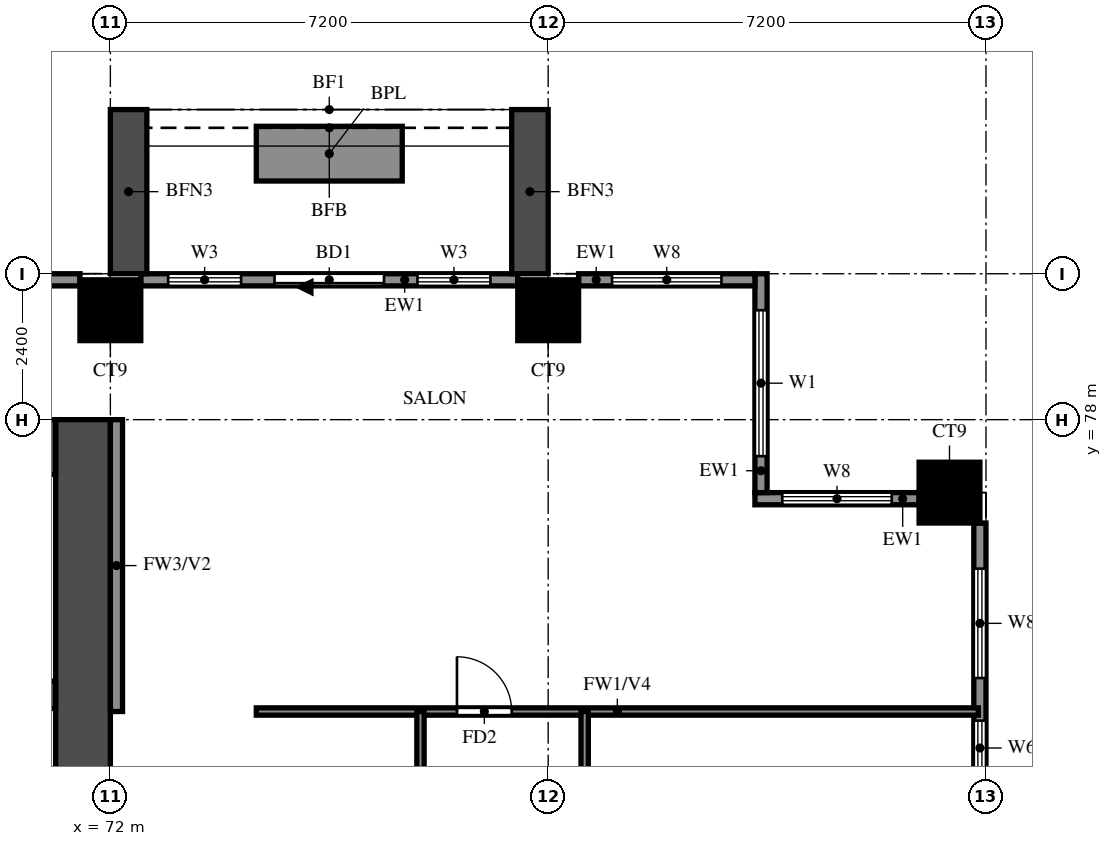
"""IFC4 building model, lengths in metres.
Left out: names, types, materials, properties, quantities, classifications, styles, units other than length and angle.
Written with IfcOpenShell. Run it as: python <this file> out.ifc"""

import sys

from ifc_helpers import new_model, si_unit, direction, frame, frame_2d, origin, origin_2d, place, context, subcontext, project, spatial, rectangle, extrude, source, transform, mapped, element, fill, save


model = new_model("IFC4")
c1 = context("Model", 3, precision=1e-05, world=origin(), true_north=direction((0.0, 1.0)))
c2 = subcontext(c1, "Body", "Model", "MODEL_VIEW")
j1 = project(units=[si_unit("LENGTHUNIT", "METRE"), si_unit("PLANEANGLEUNIT", "RADIAN")], contexts=[c1])
p1 = place(None, origin())
s1 = spatial("IfcSite", under=j1, at=p1, CompositionType="ELEMENT")
p2 = place(p1, origin())
s2 = spatial("IfcBuilding", under=s1, at=p2, CompositionType="ELEMENT")
p3 = place(p2, frame((0.0, 0.0, 65.5)))
s3 = spatial("IfcBuildingStorey", under=s2, at=p3, CompositionType="ELEMENT", Elevation=65.5)
m1 = source(origin(), c2, "Body", "SweptSolid", [
    extrude(rectangle(XDim=1.0, YDim=1.0, at=origin_2d()), origin(), (0.0, 0.0, 1.0), 3.18),
])
for number, where, z_axis, x_axis in (
    (1, (85.8, 76.8, 0.0), (0.0, 0.0, 1.0), (1.0, 0.0, 0.0)),
    (2, (72.0, 79.8, 0.0), (0.0, 0.0, 1.0), (1.0, 0.0, 0.0)),
    (3, (79.2, 79.8, 0.0), (0.0, 0.0, 1.0), (1.0, 0.0, 0.0)),
):
    element("IfcColumn", number, at=place(p3, frame(where, z_axis=z_axis, x_axis=x_axis)), inside=s3, PredefinedType="COLUMN", context=c2, shape_type="MappedRepresentation", body=[
        mapped(m1, transform((0.0, 0.0, 0.0))),
    ])
p4 = place(p3, frame((71.55, 66.0, 0.0), z_axis=(0.0, 0.0, 1.0), x_axis=(0.0, 1.0, 0.0)))
e4 = element("IfcWall", 4, at=p4, inside=s3, PredefinedType="SHEAR", context=c2, shape_type="SweptSolid", body=[
    extrude(rectangle(XDim=12.0, YDim=0.9, at=frame_2d((6.0, 0.0))), origin(), (0.0, 0.0, 1.0), 3.18),
])
p5 = place(p3, frame((29.7, 77.55, 0.0), z_axis=(0.0, 0.0, 1.0), x_axis=(1.0, 0.0, 0.0)))
e5 = element("IfcWall", 5, at=p5, inside=s3, PredefinedType="SHEAR", context=c2, shape_type="SweptSolid", body=[
    extrude(rectangle(XDim=41.4, YDim=0.9, at=frame_2d((20.7, 0.0))), origin(), (0.0, 0.0, 1.0), 3.18),
])
p6 = place(p3, frame((67.925, 73.475, 0.0), z_axis=(0.0, 0.0, 1.0), x_axis=(1.0, 0.0, 0.0)))
e6 = element("IfcWall", 6, at=p6, inside=s3, PredefinedType="SHEAR", context=c2, shape_type="SweptSolid", body=[
    extrude(rectangle(XDim=3.175, YDim=0.45, at=frame_2d((1.587, 0.0))), origin(), (0.0, 0.0, 1.0), 3.18),
])
p7 = place(p3, frame((86.3, 70.1, 0.0), z_axis=(0.0, 0.0, 1.0), x_axis=(0.0, 1.0, 0.0)))
e7 = element("IfcWall", 7, at=p7, inside=s3, PredefinedType="SOLIDWALL", context=c2, shape_type="SweptSolid", body=[
    extrude(rectangle(XDim=6.2, YDim=0.2, at=frame_2d((3.1, 0.0))), origin(), (0.0, 0.0, 1.0), 3.18),
])
p8 = place(p7, frame((2.05, 0.0, 1.5)))
e8 = element("IfcOpeningElement", 8, at=p8, cuts=e7, PredefinedType="OPENING", context=c2, shape_type="SweptSolid", body=[
    extrude(rectangle(XDim=0.9, YDim=0.9, at=frame_2d((0.45, 0.45))), frame((0.0, 0.11, 0.0), z_axis=(0.0, -1.0, 0.0), x_axis=(1.0, 0.0, 0.0)), (0.0, 0.0, 1.0), 0.22),
])
p9 = place(p7, frame((3.65, 0.0, 0.6)))
e9 = element("IfcOpeningElement", 9, at=p9, cuts=e7, PredefinedType="OPENING", context=c2, shape_type="SweptSolid", body=[
    extrude(rectangle(XDim=1.8, YDim=2.4, at=frame_2d((0.9, 1.2))), frame((0.0, 0.11, 0.0), z_axis=(0.0, -1.0, 0.0), x_axis=(1.0, 0.0, 0.0)), (0.0, 0.0, 1.0), 0.22),
])
p10 = place(p3, frame((85.3, 76.7, 0.0), z_axis=(0.0, 0.0, 1.0), x_axis=(-1.0, 0.0, 0.0)))
e10 = element("IfcWall", 10, at=p10, inside=s3, PredefinedType="SOLIDWALL", context=c2, shape_type="SweptSolid", body=[
    extrude(rectangle(XDim=2.7, YDim=0.2, at=frame_2d((1.35, 0.0))), origin(), (0.0, 0.0, 1.0), 3.18),
])
p11 = place(p10, frame((0.45, 0.0, 0.6)))
e11 = element("IfcOpeningElement", 11, at=p11, cuts=e10, PredefinedType="OPENING", context=c2, shape_type="SweptSolid", body=[
    extrude(rectangle(XDim=1.8, YDim=2.4, at=frame_2d((0.9, 1.2))), frame((0.0, 0.11, 0.0), z_axis=(0.0, -1.0, 0.0), x_axis=(1.0, 0.0, 0.0)), (0.0, 0.0, 1.0), 0.22),
])
p12 = place(p3, frame((82.7, 76.8, 0.0), z_axis=(0.0, 0.0, 1.0), x_axis=(0.0, 1.0, 0.0)))
e12 = element("IfcWall", 12, at=p12, inside=s3, PredefinedType="SOLIDWALL", context=c2, shape_type="SweptSolid", body=[
    extrude(rectangle(XDim=3.6, YDim=0.2, at=frame_2d((1.8, 0.0))), origin(), (0.0, 0.0, 1.0), 3.18),
])
p13 = place(p12, frame((0.6, 0.0, 0.6)))
e13 = element("IfcOpeningElement", 13, at=p13, cuts=e12, PredefinedType="OPENING", context=c2, shape_type="SweptSolid", body=[
    extrude(rectangle(XDim=2.4, YDim=2.4, at=frame_2d((1.2, 1.2))), frame((0.0, 0.11, 0.0), z_axis=(0.0, -1.0, 0.0), x_axis=(1.0, 0.0, 0.0)), (0.0, 0.0, 1.0), 0.22),
])
p14 = place(p3, frame((82.6, 80.3, 0.0), z_axis=(0.0, 0.0, 1.0), x_axis=(-1.0, 0.0, 0.0)))
e14 = element("IfcWall", 14, at=p14, inside=s3, PredefinedType="SOLIDWALL", context=c2, shape_type="SweptSolid", body=[
    extrude(rectangle(XDim=2.9, YDim=0.2, at=frame_2d((1.45, 0.0))), origin(), (0.0, 0.0, 1.0), 3.18),
])
p15 = place(p14, frame((0.55, 0.0, 0.6)))
e15 = element("IfcOpeningElement", 15, at=p15, cuts=e14, PredefinedType="OPENING", context=c2, shape_type="SweptSolid", body=[
    extrude(rectangle(XDim=1.8, YDim=2.4, at=frame_2d((0.9, 1.2))), frame((0.0, 0.11, 0.0), z_axis=(0.0, -1.0, 0.0), x_axis=(1.0, 0.0, 0.0)), (0.0, 0.0, 1.0), 0.22),
])
p16 = place(p3, frame((78.7, 80.3, 0.0), z_axis=(0.0, 0.0, 1.0), x_axis=(-1.0, 0.0, 0.0)))
e16 = element("IfcWall", 16, at=p16, inside=s3, PredefinedType="SOLIDWALL", context=c2, shape_type="SweptSolid", body=[
    extrude(rectangle(XDim=6.2, YDim=0.2, at=frame_2d((3.1, 0.0))), origin(), (0.0, 0.0, 1.0), 3.18),
])
p17 = place(p16, frame((2.2, 0.0, 0.0)))
e17 = element("IfcOpeningElement", 17, at=p17, cuts=e16, PredefinedType="OPENING", context=c2, shape_type="SweptSolid", body=[
    extrude(rectangle(XDim=1.8, YDim=2.4, at=frame_2d((0.9, 1.2))), frame((0.0, 0.11, 0.0), z_axis=(0.0, -1.0, 0.0), x_axis=(1.0, 0.0, 0.0)), (0.0, 0.0, 1.0), 0.22),
])
p18 = place(p16, frame((0.45, 0.0, 0.6)))
e18 = element("IfcOpeningElement", 18, at=p18, cuts=e16, PredefinedType="OPENING", context=c2, shape_type="SweptSolid", body=[
    extrude(rectangle(XDim=1.2, YDim=2.4, at=frame_2d((0.6, 1.2))), frame((0.0, 0.11, 0.0), z_axis=(0.0, -1.0, 0.0), x_axis=(1.0, 0.0, 0.0)), (0.0, 0.0, 1.0), 0.22),
])
p19 = place(p16, frame((4.55, 0.0, 0.6)))
e19 = element("IfcOpeningElement", 19, at=p19, cuts=e16, PredefinedType="OPENING", context=c2, shape_type="SweptSolid", body=[
    extrude(rectangle(XDim=1.2, YDim=2.4, at=frame_2d((0.6, 1.2))), frame((0.0, 0.11, 0.0), z_axis=(0.0, -1.0, 0.0), x_axis=(1.0, 0.0, 0.0)), (0.0, 0.0, 1.0), 0.22),
])
p20 = place(p3, frame((71.5, 80.3, 0.0), z_axis=(0.0, 0.0, 1.0), x_axis=(-1.0, 0.0, 0.0)))
e20 = element("IfcWall", 20, at=p20, inside=s3, PredefinedType="SOLIDWALL", context=c2, shape_type="SweptSolid", body=[
    extrude(rectangle(XDim=6.2, YDim=0.2, at=frame_2d((3.1, 0.0))), origin(), (0.0, 0.0, 1.0), 3.18),
])
for number, where, z_axis, x_axis in (
    (21, (78.9, 80.4, 0.0), (0.0, 0.0, 1.0), (0.0, 1.0, 0.0)),
    (22, (72.3, 80.4, 0.0), (0.0, 0.0, 1.0), (0.0, 1.0, 0.0)),
):
    element("IfcWall", number, at=place(p3, frame(where, z_axis=z_axis, x_axis=x_axis)), inside=s3, PredefinedType="SOLIDWALL", context=c2, shape_type="SweptSolid", body=[
        extrude(rectangle(XDim=2.7, YDim=0.6, at=frame_2d((1.35, 0.0))), origin(), (0.0, 0.0, 1.0), 2.85),
    ])
p21 = place(p3, frame((76.8, 82.375, 0.0), z_axis=(0.0, 0.0, 1.0), x_axis=(-1.0, 0.0, 0.0)))
e23 = element("IfcWall", 23, at=p21, inside=s3, PredefinedType="SOLIDWALL", context=c2, shape_type="SweptSolid", body=[
    extrude(rectangle(XDim=2.4, YDim=0.9, at=frame_2d((1.2, 0.0))), origin(), (0.0, 0.0, 1.0), 0.9),
])
p22 = place(p3, frame((72.1, 73.2, 0.0), z_axis=(0.0, 0.0, 1.0), x_axis=(0.0, 1.0, 0.0)))
e24 = element("IfcWall", 24, at=p22, inside=s3, PredefinedType="SOLIDWALL", context=c2, shape_type="SweptSolid", body=[
    extrude(rectangle(XDim=4.8, YDim=0.2, at=frame_2d((2.4, 0.0))), origin(), (0.0, 0.0, 1.0), 3.18),
])
p23 = place(p3, frame((74.4, 73.2, 0.0), z_axis=(0.0, 0.0, 1.0), x_axis=(1.0, 0.0, 0.0)))
e25 = element("IfcWall", 25, at=p23, inside=s3, PredefinedType="PARTITIONING", context=c2, shape_type="SweptSolid", body=[
    extrude(rectangle(XDim=11.875, YDim=0.12, at=frame_2d((5.938, 0.0))), origin(), (0.0, 0.0, 1.0), 2.28),
])
p24 = place(p23, frame((3.3, 0.0, 0.0)))
e26 = element("IfcOpeningElement", 26, at=p24, cuts=e25, PredefinedType="OPENING", context=c2, shape_type="SweptSolid", body=[
    extrude(rectangle(XDim=0.9, YDim=2.1, at=frame_2d((0.45, 1.05))), frame((0.0, 0.07, 0.0), z_axis=(0.0, -1.0, 0.0), x_axis=(1.0, 0.0, 0.0)), (0.0, 0.0, 1.0), 0.14),
])
p25 = place(p3, frame((77.1, 64.8, 0.0), z_axis=(0.0, 0.0, 1.0), x_axis=(0.0, 1.0, 0.0)))
e27 = element("IfcWall", 27, at=p25, inside=s3, PredefinedType="PARTITIONING", context=c2, shape_type="SweptSolid", body=[
    extrude(rectangle(XDim=8.4, YDim=0.12, at=frame_2d((4.2, 0.0))), origin(), (0.0, 0.0, 1.0), 3.18),
])
p26 = place(p25, frame((5.05, 0.0, 0.0)))
e28 = element("IfcOpeningElement", 28, at=p26, cuts=e27, PredefinedType="OPENING", context=c2, shape_type="SweptSolid", body=[
    extrude(rectangle(XDim=0.9, YDim=2.1, at=frame_2d((0.45, 1.05))), frame((0.0, 0.07, 0.0), z_axis=(0.0, -1.0, 0.0), x_axis=(1.0, 0.0, 0.0)), (0.0, 0.0, 1.0), 0.14),
])
p27 = place(p3, frame((79.8, 69.6, 0.0), z_axis=(0.0, 0.0, 1.0), x_axis=(0.0, 1.0, 0.0)))
e29 = element("IfcWall", 29, at=p27, inside=s3, PredefinedType="PARTITIONING", context=c2, shape_type="SweptSolid", body=[
    extrude(rectangle(XDim=3.6, YDim=0.12, at=frame_2d((1.8, 0.0))), origin(), (0.0, 0.0, 1.0), 3.18),
])
p28 = place(p8, origin())
e30 = element("IfcWindow", 30, at=p28, inside=s3, PartitioningType="SINGLE_PANEL", PredefinedType="WINDOW", context=c2, shape_type="SweptSolid", body=[
    extrude(rectangle(XDim=0.9, YDim=0.9, at=frame_2d((0.45, 0.45))), frame((0.0, 0.03, 0.0), z_axis=(0.0, -1.0, 0.0), x_axis=(1.0, 0.0, 0.0)), (0.0, 0.0, 1.0), 0.06),
])
fill(e8, e30)
p29 = place(p9, origin())
e31 = element("IfcWindow", 31, at=p29, inside=s3, PartitioningType="DOUBLE_PANEL_VERTICAL", PredefinedType="WINDOW", context=c2, shape_type="SweptSolid", body=[
    extrude(rectangle(XDim=1.8, YDim=2.4, at=frame_2d((0.9, 1.2))), frame((0.0, 0.03, 0.0), z_axis=(0.0, -1.0, 0.0), x_axis=(1.0, 0.0, 0.0)), (0.0, 0.0, 1.0), 0.06),
])
fill(e9, e31)
p30 = place(p11, origin())
e32 = element("IfcWindow", 32, at=p30, inside=s3, PartitioningType="DOUBLE_PANEL_VERTICAL", PredefinedType="WINDOW", context=c2, shape_type="SweptSolid", body=[
    extrude(rectangle(XDim=1.8, YDim=2.4, at=frame_2d((0.9, 1.2))), frame((0.0, 0.03, 0.0), z_axis=(0.0, -1.0, 0.0), x_axis=(1.0, 0.0, 0.0)), (0.0, 0.0, 1.0), 0.06),
])
fill(e11, e32)
p31 = place(p13, origin())
e33 = element("IfcWindow", 33, at=p31, inside=s3, PartitioningType="DOUBLE_PANEL_VERTICAL", PredefinedType="WINDOW", context=c2, shape_type="SweptSolid", body=[
    extrude(rectangle(XDim=2.4, YDim=2.4, at=frame_2d((1.2, 1.2))), frame((0.0, 0.03, 0.0), z_axis=(0.0, -1.0, 0.0), x_axis=(1.0, 0.0, 0.0)), (0.0, 0.0, 1.0), 0.06),
])
fill(e13, e33)
p32 = place(p15, origin())
e34 = element("IfcWindow", 34, at=p32, inside=s3, PartitioningType="DOUBLE_PANEL_VERTICAL", PredefinedType="WINDOW", context=c2, shape_type="SweptSolid", body=[
    extrude(rectangle(XDim=1.8, YDim=2.4, at=frame_2d((0.9, 1.2))), frame((0.0, 0.03, 0.0), z_axis=(0.0, -1.0, 0.0), x_axis=(1.0, 0.0, 0.0)), (0.0, 0.0, 1.0), 0.06),
])
fill(e15, e34)
p33 = place(p17, origin())
e35 = element("IfcDoor", 35, at=p33, inside=s3, OperationType="DOUBLE_DOOR_SLIDING", PredefinedType="DOOR", context=c2, shape_type="SweptSolid", body=[
    extrude(rectangle(XDim=1.8, YDim=2.4, at=frame_2d((0.9, 1.2))), frame((0.0, 0.025, 0.0), z_axis=(0.0, -1.0, 0.0), x_axis=(1.0, 0.0, 0.0)), (0.0, 0.0, 1.0), 0.05),
])
fill(e17, e35)
p34 = place(p18, origin())
e36 = element("IfcWindow", 36, at=p34, inside=s3, PartitioningType="SINGLE_PANEL", PredefinedType="WINDOW", context=c2, shape_type="SweptSolid", body=[
    extrude(rectangle(XDim=1.2, YDim=2.4, at=frame_2d((0.6, 1.2))), frame((0.0, 0.03, 0.0), z_axis=(0.0, -1.0, 0.0), x_axis=(1.0, 0.0, 0.0)), (0.0, 0.0, 1.0), 0.06),
])
fill(e18, e36)
p35 = place(p19, origin())
e37 = element("IfcWindow", 37, at=p35, inside=s3, PartitioningType="SINGLE_PANEL", PredefinedType="WINDOW", context=c2, shape_type="SweptSolid", body=[
    extrude(rectangle(XDim=1.2, YDim=2.4, at=frame_2d((0.6, 1.2))), frame((0.0, 0.03, 0.0), z_axis=(0.0, -1.0, 0.0), x_axis=(1.0, 0.0, 0.0)), (0.0, 0.0, 1.0), 0.06),
])
fill(e19, e37)
p36 = place(p24, origin())
e38 = element("IfcDoor", 38, at=p36, inside=s3, OperationType="SINGLE_SWING_LEFT", PredefinedType="DOOR", context=c2, shape_type="SweptSolid", body=[
    extrude(rectangle(XDim=0.9, YDim=2.1, at=frame_2d((0.45, 1.05))), frame((0.0, 0.025, 0.0), z_axis=(0.0, -1.0, 0.0), x_axis=(1.0, 0.0, 0.0)), (0.0, 0.0, 1.0), 0.05),
])
fill(e26, e38)
save(model, sys.argv[1])
